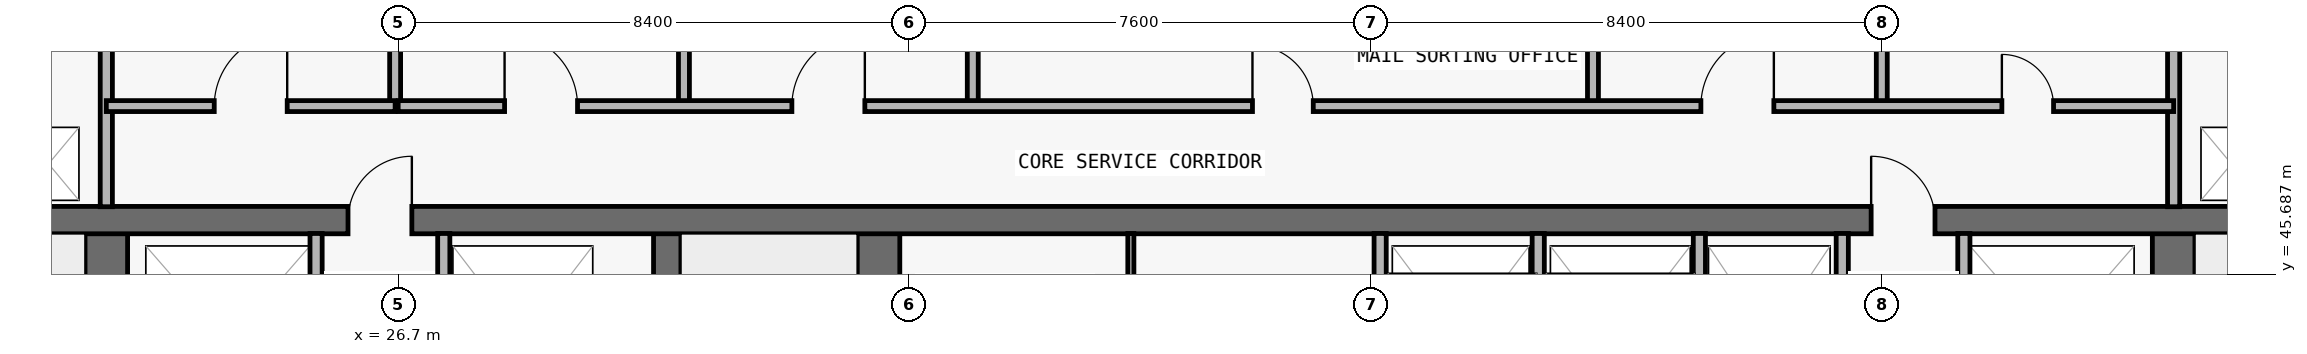
"""IFC4 building model, lengths in metres.
Left out: names, types, materials, properties, quantities, classifications, styles, units other than length and angle.
Written with IfcOpenShell. Run it as: python <this file> out.ifc"""

import sys

from ifc_helpers import new_model, si_unit, direction, frame, frame_2d, origin, place, context, subcontext, project, spatial, rectangle, extrude, element, fill, save


model = new_model("IFC4")
c1 = context("Model", 3, precision=1e-05, world=origin(), true_north=direction((0.0, 1.0)))
c2 = subcontext(c1, "Body", "Model", "MODEL_VIEW")
j1 = project(units=[si_unit("LENGTHUNIT", "METRE"), si_unit("PLANEANGLEUNIT", "RADIAN")], contexts=[c1])
p1 = place(None, origin())
s1 = spatial("IfcSite", under=j1, at=p1, CompositionType="ELEMENT")
p2 = place(p1, origin())
s2 = spatial("IfcBuilding", under=s1, at=p2, CompositionType="ELEMENT")
p3 = place(p2, frame((0.0, 0.0, 105.9)))
s3 = spatial("IfcBuildingStorey", under=s2, at=p3, CompositionType="ELEMENT", Elevation=105.9)
p4 = place(p3, frame((21.9, 36.95, 0.0), z_axis=(0.0, 0.0, 1.0), x_axis=(0.0, 1.0, 0.0)))
e1 = element("IfcWall", 1, at=p4, inside=s3, PredefinedType="SHEAR", context=c2, shape_type="SweptSolid", body=[
    extrude(rectangle(XDim=9.625, YDim=0.7, at=frame_2d((4.812, 0.0))), origin(), (0.0, 0.0, 1.0), 3.05),
])
p5 = place(p4, frame((0.6, 0.0, 0.0)))
e2 = element("IfcOpeningElement", 2, at=p5, cuts=e1, PredefinedType="OPENING", context=c2, shape_type="SweptSolid", body=[
    extrude(rectangle(XDim=1.1, YDim=2.15, at=frame_2d((0.55, 1.075))), frame((0.0, 0.36, 0.0), z_axis=(0.0, -1.0, 0.0), x_axis=(1.0, 0.0, 0.0)), (0.0, 0.0, 1.0), 0.72),
])
p6 = place(p3, frame((55.9, 36.95, 0.0), z_axis=(0.0, 0.0, 1.0), x_axis=(0.0, 1.0, 0.0)))
e3 = element("IfcWall", 3, at=p6, inside=s3, PredefinedType="SHEAR", context=c2, shape_type="SweptSolid", body=[
    extrude(rectangle(XDim=9.625, YDim=0.7, at=frame_2d((4.812, 0.0))), origin(), (0.0, 0.0, 1.0), 3.05),
])
p7 = place(p6, frame((0.6, 0.0, 0.0)))
e4 = element("IfcOpeningElement", 4, at=p7, cuts=e3, PredefinedType="OPENING", context=c2, shape_type="SweptSolid", body=[
    extrude(rectangle(XDim=1.1, YDim=2.15, at=frame_2d((0.55, 1.075))), frame((0.0, 0.36, 0.0), z_axis=(0.0, -1.0, 0.0), x_axis=(1.0, 0.0, 0.0)), (0.0, 0.0, 1.0), 0.72),
])
p8 = place(p3, frame((31.125, 36.95, 0.0), z_axis=(0.0, 0.0, 1.0), x_axis=(0.0, 1.0, 0.0)))
e5 = element("IfcWall", 5, at=p8, inside=s3, PredefinedType="SHEAR", context=c2, shape_type="SweptSolid", body=[
    extrude(rectangle(XDim=9.625, YDim=0.45, at=frame_2d((4.812, 0.0))), origin(), (0.0, 0.0, 1.0), 3.05),
])
p9 = place(p3, frame((34.6, 36.95, 0.0), z_axis=(0.0, 0.0, 1.0), x_axis=(0.0, 1.0, 0.0)))
e6 = element("IfcWall", 6, at=p9, inside=s3, PredefinedType="SHEAR", context=c2, shape_type="SweptSolid", body=[
    extrude(rectangle(XDim=9.625, YDim=0.7, at=frame_2d((4.812, 0.0))), origin(), (0.0, 0.0, 1.0), 3.05),
])
p10 = place(p3, frame((18.25, 46.575, 0.0), z_axis=(0.0, 0.0, 1.0), x_axis=(1.0, 0.0, 0.0)))
e7 = element("IfcWall", 7, at=p10, inside=s3, PredefinedType="SHEAR", context=c2, shape_type="SweptSolid", body=[
    extrude(rectangle(XDim=41.3, YDim=0.45, at=frame_2d((20.65, 0.0))), origin(), (0.0, 0.0, 1.0), 3.05),
])
p11 = place(p10, frame((7.625, 0.0, 0.0)))
e8 = element("IfcOpeningElement", 8, at=p11, cuts=e7, PredefinedType="OPENING", context=c2, shape_type="SweptSolid", body=[
    extrude(rectangle(XDim=1.05, YDim=2.15, at=frame_2d((0.525, 1.075))), frame((0.0, 0.235, 0.0), z_axis=(0.0, -1.0, 0.0), x_axis=(1.0, 0.0, 0.0)), (0.0, 0.0, 1.0), 0.47),
])
p12 = place(p10, frame((32.675, 0.0, 0.0)))
e9 = element("IfcOpeningElement", 9, at=p12, cuts=e7, PredefinedType="OPENING", context=c2, shape_type="SweptSolid", body=[
    extrude(rectangle(XDim=1.05, YDim=2.15, at=frame_2d((0.525, 1.075))), frame((0.0, 0.235, 0.0), z_axis=(0.0, -1.0, 0.0), x_axis=(1.0, 0.0, 0.0)), (0.0, 0.0, 1.0), 0.47),
])
p13 = place(p3, frame((21.9, 46.795, 0.0), z_axis=(0.0, 0.0, 1.0), x_axis=(0.0, 1.0, 0.0)))
e10 = element("IfcWall", 10, at=p13, inside=s3, PredefinedType="PARTITIONING", context=c2, shape_type="SweptSolid", body=[
    extrude(rectangle(XDim=3.16, YDim=0.2, at=frame_2d((1.58, 0.0))), origin(), (0.0, 0.0, 1.0), 3.05),
])
p14 = place(p3, frame((25.35, 43.17, 0.0), z_axis=(0.0, 0.0, 1.0), x_axis=(0.0, 1.0, 0.0)))
e11 = element("IfcWall", 11, at=p14, inside=s3, PredefinedType="PARTITIONING", context=c2, shape_type="SweptSolid", body=[
    extrude(rectangle(XDim=3.185, YDim=0.2, at=frame_2d((1.593, 0.0))), origin(), (0.0, 0.0, 1.0), 3.05),
])
p15 = place(p3, frame((26.65, 48.45, 0.0), z_axis=(0.0, 0.0, 1.0), x_axis=(0.0, 1.0, 0.0)))
e12 = element("IfcWall", 12, at=p15, inside=s3, PredefinedType="PARTITIONING", context=c2, shape_type="SweptSolid", body=[
    extrude(rectangle(XDim=1.505, YDim=0.18, at=frame_2d((0.752, 0.0))), origin(), (0.0, 0.0, 1.0), 3.05),
])
p16 = place(p3, frame((27.45, 43.17, 0.0), z_axis=(0.0, 0.0, 1.0), x_axis=(0.0, 1.0, 0.0)))
e13 = element("IfcWall", 13, at=p16, inside=s3, PredefinedType="PARTITIONING", context=c2, shape_type="SweptSolid", body=[
    extrude(rectangle(XDim=3.185, YDim=0.2, at=frame_2d((1.593, 0.0))), origin(), (0.0, 0.0, 1.0), 3.05),
])
for number, where, z_axis, x_axis in (
    (14, (31.4, 48.45, 0.0), (0.0, 0.0, 1.0), (0.0, 1.0, 0.0)),
    (15, (36.15, 48.45, 0.0), (0.0, 0.0, 1.0), (0.0, 1.0, 0.0)),
):
    element("IfcWall", number, at=place(p3, frame(where, z_axis=z_axis, x_axis=x_axis)), inside=s3, PredefinedType="PARTITIONING", context=c2, shape_type="SweptSolid", body=[
        extrude(rectangle(XDim=1.505, YDim=0.18, at=frame_2d((0.752, 0.0))), origin(), (0.0, 0.0, 1.0), 3.05),
    ])
p17 = place(p3, frame((38.75, 43.17, 0.0), z_axis=(0.0, 0.0, 1.0), x_axis=(0.0, 1.0, 0.0)))
e16 = element("IfcWall", 16, at=p17, inside=s3, PredefinedType="MOVABLE", context=c2, shape_type="SweptSolid", body=[
    extrude(rectangle(XDim=3.185, YDim=0.1, at=frame_2d((1.593, 0.0))), origin(), (0.0, 0.0, 1.0), 3.05),
])
for number, where, z_axis, x_axis in (
    (17, (42.85, 43.17, 0.0), (0.0, 0.0, 1.0), (0.0, 1.0, 0.0)),
    (18, (45.45, 43.17, 0.0), (0.0, 0.0, 1.0), (0.0, 1.0, 0.0)),
):
    element("IfcWall", number, at=place(p3, frame(where, z_axis=z_axis, x_axis=x_axis)), inside=s3, PredefinedType="PARTITIONING", context=c2, shape_type="SweptSolid", body=[
        extrude(rectangle(XDim=3.185, YDim=0.2, at=frame_2d((1.593, 0.0))), origin(), (0.0, 0.0, 1.0), 3.05),
    ])
p18 = place(p3, frame((46.35, 48.45, 0.0), z_axis=(0.0, 0.0, 1.0), x_axis=(0.0, 1.0, 0.0)))
e19 = element("IfcWall", 19, at=p18, inside=s3, PredefinedType="PARTITIONING", context=c2, shape_type="SweptSolid", body=[
    extrude(rectangle(XDim=1.505, YDim=0.18, at=frame_2d((0.752, 0.0))), origin(), (0.0, 0.0, 1.0), 3.05),
])
for number, where, z_axis, x_axis in (
    (20, (48.1, 43.17, 0.0), (0.0, 0.0, 1.0), (0.0, 1.0, 0.0)),
    (21, (50.45, 43.17, 0.0), (0.0, 0.0, 1.0), (0.0, 1.0, 0.0)),
):
    element("IfcWall", number, at=place(p3, frame(where, z_axis=z_axis, x_axis=x_axis)), inside=s3, PredefinedType="PARTITIONING", context=c2, shape_type="SweptSolid", body=[
        extrude(rectangle(XDim=3.185, YDim=0.2, at=frame_2d((1.593, 0.0))), origin(), (0.0, 0.0, 1.0), 3.05),
    ])
p19 = place(p3, frame((51.1, 48.45, 0.0), z_axis=(0.0, 0.0, 1.0), x_axis=(0.0, 1.0, 0.0)))
e22 = element("IfcWall", 22, at=p19, inside=s3, PredefinedType="PARTITIONING", context=c2, shape_type="SweptSolid", body=[
    extrude(rectangle(XDim=1.505, YDim=0.18, at=frame_2d((0.752, 0.0))), origin(), (0.0, 0.0, 1.0), 3.05),
])
p20 = place(p3, frame((52.45, 43.17, 0.0), z_axis=(0.0, 0.0, 1.0), x_axis=(0.0, 1.0, 0.0)))
e23 = element("IfcWall", 23, at=p20, inside=s3, PredefinedType="PARTITIONING", context=c2, shape_type="SweptSolid", body=[
    extrude(rectangle(XDim=3.185, YDim=0.2, at=frame_2d((1.593, 0.0))), origin(), (0.0, 0.0, 1.0), 3.05),
])
p21 = place(p3, frame((55.9, 46.795, 0.0), z_axis=(0.0, 0.0, 1.0), x_axis=(0.0, 1.0, 0.0)))
e24 = element("IfcWall", 24, at=p21, inside=s3, PredefinedType="PARTITIONING", context=c2, shape_type="SweptSolid", body=[
    extrude(rectangle(XDim=3.16, YDim=0.2, at=frame_2d((1.58, 0.0))), origin(), (0.0, 0.0, 1.0), 3.05),
])
p22 = place(p3, frame((21.9, 48.45, 0.0), z_axis=(0.0, 0.0, 1.0), x_axis=(1.0, 0.0, 0.0)))
e25 = element("IfcWall", 25, at=p22, inside=s3, PredefinedType="PARTITIONING", context=c2, shape_type="SweptSolid", body=[
    extrude(rectangle(XDim=4.75, YDim=0.18, at=frame_2d((2.375, 0.0))), origin(), (0.0, 0.0, 1.0), 3.05),
])
p23 = place(p22, frame((1.775, 0.0, 0.0)))
e26 = element("IfcOpeningElement", 26, at=p23, cuts=e25, PredefinedType="OPENING", context=c2, shape_type="SweptSolid", body=[
    extrude(rectangle(XDim=1.2, YDim=2.2, at=frame_2d((0.6, 1.1))), frame((0.0, 0.1, 0.0), z_axis=(0.0, -1.0, 0.0), x_axis=(1.0, 0.0, 0.0)), (0.0, 0.0, 1.0), 0.2),
])
p24 = place(p3, frame((26.7, 48.45, 0.0), z_axis=(0.0, 0.0, 1.0), x_axis=(1.0, 0.0, 0.0)))
e27 = element("IfcWall", 27, at=p24, inside=s3, PredefinedType="PARTITIONING", context=c2, shape_type="SweptSolid", body=[
    extrude(rectangle(XDim=29.2, YDim=0.18, at=frame_2d((14.6, 0.0))), origin(), (0.0, 0.0, 1.0), 3.05),
])
p25 = place(p24, frame((1.75, 0.0, 0.0)))
e28 = element("IfcOpeningElement", 28, at=p25, cuts=e27, PredefinedType="OPENING", context=c2, shape_type="SweptSolid", body=[
    extrude(rectangle(XDim=1.2, YDim=2.2, at=frame_2d((0.6, 1.1))), frame((0.0, 0.1, 0.0), z_axis=(0.0, -1.0, 0.0), x_axis=(1.0, 0.0, 0.0)), (0.0, 0.0, 1.0), 0.2),
])
p26 = place(p24, frame((6.475, 0.0, 0.0)))
e29 = element("IfcOpeningElement", 29, at=p26, cuts=e27, PredefinedType="OPENING", context=c2, shape_type="SweptSolid", body=[
    extrude(rectangle(XDim=1.2, YDim=2.2, at=frame_2d((0.6, 1.1))), frame((0.0, 0.1, 0.0), z_axis=(0.0, -1.0, 0.0), x_axis=(1.0, 0.0, 0.0)), (0.0, 0.0, 1.0), 0.2),
])
p27 = place(p24, frame((14.05, 0.0, 0.0)))
e30 = element("IfcOpeningElement", 30, at=p27, cuts=e27, PredefinedType="OPENING", context=c2, shape_type="SweptSolid", body=[
    extrude(rectangle(XDim=1.0, YDim=2.2, at=frame_2d((0.5, 1.1))), frame((0.0, 0.1, 0.0), z_axis=(0.0, -1.0, 0.0), x_axis=(1.0, 0.0, 0.0)), (0.0, 0.0, 1.0), 0.2),
])
p28 = place(p24, frame((21.425, 0.0, 0.0)))
e31 = element("IfcOpeningElement", 31, at=p28, cuts=e27, PredefinedType="OPENING", context=c2, shape_type="SweptSolid", body=[
    extrude(rectangle(XDim=1.2, YDim=2.2, at=frame_2d((0.6, 1.1))), frame((0.0, 0.1, 0.0), z_axis=(0.0, -1.0, 0.0), x_axis=(1.0, 0.0, 0.0)), (0.0, 0.0, 1.0), 0.2),
])
p29 = place(p24, frame((26.375, 0.0, 0.0)))
e32 = element("IfcOpeningElement", 32, at=p29, cuts=e27, PredefinedType="OPENING", context=c2, shape_type="SweptSolid", body=[
    extrude(rectangle(XDim=0.85, YDim=2.1, at=frame_2d((0.425, 1.05))), frame((0.0, 0.1, 0.0), z_axis=(0.0, -1.0, 0.0), x_axis=(1.0, 0.0, 0.0)), (0.0, 0.0, 1.0), 0.2),
])
p30 = place(p11, origin())
e33 = element("IfcDoor", 33, at=p30, inside=s3, OperationType="SINGLE_SWING_RIGHT", PredefinedType="DOOR", context=c2, shape_type="SweptSolid", body=[
    extrude(rectangle(XDim=1.05, YDim=2.15, at=frame_2d((0.525, 1.075))), frame((0.0, 0.025, 0.0), z_axis=(0.0, -1.0, 0.0), x_axis=(1.0, 0.0, 0.0)), (0.0, 0.0, 1.0), 0.05),
])
fill(e8, e33)
p31 = place(p12, origin())
e34 = element("IfcDoor", 34, at=p31, inside=s3, OperationType="SINGLE_SWING_LEFT", PredefinedType="DOOR", context=c2, shape_type="SweptSolid", body=[
    extrude(rectangle(XDim=1.05, YDim=2.15, at=frame_2d((0.525, 1.075))), frame((0.0, 0.025, 0.0), z_axis=(0.0, -1.0, 0.0), x_axis=(1.0, 0.0, 0.0)), (0.0, 0.0, 1.0), 0.05),
])
fill(e9, e34)
p32 = place(p23, origin())
e35 = element("IfcDoor", 35, at=p32, inside=s3, OperationType="SINGLE_SWING_RIGHT", PredefinedType="DOOR", context=c2, shape_type="SweptSolid", body=[
    extrude(rectangle(XDim=1.2, YDim=2.2, at=frame_2d((0.6, 1.1))), frame((0.0, 0.025, 0.0), z_axis=(0.0, -1.0, 0.0), x_axis=(1.0, 0.0, 0.0)), (0.0, 0.0, 1.0), 0.05),
])
fill(e26, e35)
p33 = place(p25, origin())
e36 = element("IfcDoor", 36, at=p33, inside=s3, OperationType="SINGLE_SWING_LEFT", PredefinedType="DOOR", context=c2, shape_type="SweptSolid", body=[
    extrude(rectangle(XDim=1.2, YDim=2.2, at=frame_2d((0.6, 1.1))), frame((0.0, 0.025, 0.0), z_axis=(0.0, -1.0, 0.0), x_axis=(1.0, 0.0, 0.0)), (0.0, 0.0, 1.0), 0.05),
])
fill(e28, e36)
p34 = place(p26, origin())
e37 = element("IfcDoor", 37, at=p34, inside=s3, OperationType="SINGLE_SWING_RIGHT", PredefinedType="DOOR", context=c2, shape_type="SweptSolid", body=[
    extrude(rectangle(XDim=1.2, YDim=2.2, at=frame_2d((0.6, 1.1))), frame((0.0, 0.025, 0.0), z_axis=(0.0, -1.0, 0.0), x_axis=(1.0, 0.0, 0.0)), (0.0, 0.0, 1.0), 0.05),
])
fill(e29, e37)
p35 = place(p27, origin())
e38 = element("IfcDoor", 38, at=p35, inside=s3, OperationType="SINGLE_SWING_LEFT", PredefinedType="DOOR", context=c2, shape_type="SweptSolid", body=[
    extrude(rectangle(XDim=1.0, YDim=2.2, at=frame_2d((0.5, 1.1))), frame((0.0, 0.025, 0.0), z_axis=(0.0, -1.0, 0.0), x_axis=(1.0, 0.0, 0.0)), (0.0, 0.0, 1.0), 0.05),
])
fill(e30, e38)
p36 = place(p28, origin())
e39 = element("IfcDoor", 39, at=p36, inside=s3, OperationType="SINGLE_SWING_RIGHT", PredefinedType="DOOR", context=c2, shape_type="SweptSolid", body=[
    extrude(rectangle(XDim=1.2, YDim=2.2, at=frame_2d((0.6, 1.1))), frame((0.0, 0.025, 0.0), z_axis=(0.0, -1.0, 0.0), x_axis=(1.0, 0.0, 0.0)), (0.0, 0.0, 1.0), 0.05),
])
fill(e31, e39)
p37 = place(p29, origin())
e40 = element("IfcDoor", 40, at=p37, inside=s3, OperationType="SINGLE_SWING_LEFT", PredefinedType="DOOR", context=c2, shape_type="SweptSolid", body=[
    extrude(rectangle(XDim=0.85, YDim=2.1, at=frame_2d((0.425, 1.05))), frame((0.0, 0.025, 0.0), z_axis=(0.0, -1.0, 0.0), x_axis=(1.0, 0.0, 0.0)), (0.0, 0.0, 1.0), 0.05),
])
fill(e32, e40)
save(model, sys.argv[1])
